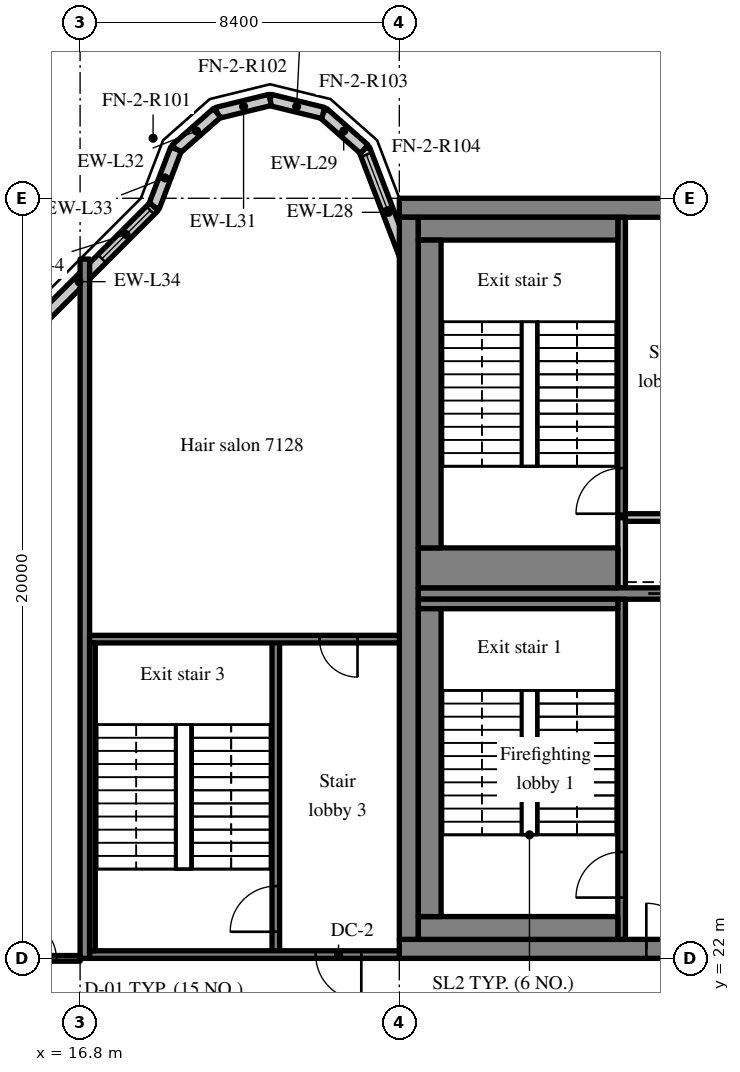
"""IFC4 building model, lengths in metres.
Left out: names, types, materials, properties, quantities, classifications, styles, units other than length and angle.
Written with IfcOpenShell. Run it as: python <this file> out.ifc"""

import sys

from ifc_helpers import new_model, si_unit, direction, frame, frame_2d, origin, place, context, subcontext, project, spatial, rectangle, extrude, source, transform, mapped, element, fill, save


model = new_model("IFC4")
c1 = context("Model", 3, precision=1e-05, world=origin(), true_north=direction((0.0, 1.0)))
c2 = subcontext(c1, "Body", "Model", "MODEL_VIEW")
j1 = project(units=[si_unit("LENGTHUNIT", "METRE"), si_unit("PLANEANGLEUNIT", "RADIAN")], contexts=[c1])
p1 = place(None, origin())
s1 = spatial("IfcSite", under=j1, at=p1, CompositionType="ELEMENT")
p2 = place(p1, origin())
s2 = spatial("IfcBuilding", under=s1, at=p2, CompositionType="ELEMENT")
p3 = place(p2, frame((0.0, 0.0, 297.7)))
s3 = spatial("IfcBuildingStorey", under=s2, at=p3, CompositionType="ELEMENT", Elevation=297.7)
m1 = source(origin(), c2, "Body", "SweptSolid", [
    extrude(rectangle(XDim=50.4, YDim=0.5, at=frame_2d((25.2, 0.0))), origin(), (0.0, 0.0, 1.0), 3.72),
])
p4 = place(p3, frame((25.2, 22.25, 0.0), z_axis=(0.0, 0.0, 1.0), x_axis=(1.0, 0.0, 0.0)))
e1 = element("IfcWall", 1, at=p4, inside=s3, PredefinedType="SHEAR", context=c2, shape_type="MappedRepresentation", body=[
    mapped(m1, transform((0.0, 0.0, 0.0), scale=1.0)),
])
m2 = source(origin(), c2, "Body", "SweptSolid", [
    extrude(rectangle(XDim=1.8, YDim=2.1, at=frame_2d((0.9, 1.05))), frame((0.0, 0.26, 0.0), z_axis=(0.0, -1.0, 0.0), x_axis=(1.0, 0.0, 0.0)), (0.0, 0.0, 1.0), 0.52),
])
p5 = place(p4, frame((15.9, 0.0, 0.0)))
e2 = element("IfcOpeningElement", 2, at=p5, cuts=e1, PredefinedType="OPENING", context=c2, shape_type="MappedRepresentation", body=[
    mapped(m2, transform((0.0, 0.0, 0.0), scale=1.0)),
])
m3 = source(origin(), c2, "Body", "SweptSolid", [
    extrude(rectangle(XDim=0.9, YDim=2.1, at=frame_2d((0.45, 1.05))), frame((0.0, 0.26, 0.0), z_axis=(0.0, -1.0, 0.0), x_axis=(1.0, 0.0, 0.0)), (0.0, 0.0, 1.0), 0.52),
])
p6 = place(p4, frame((9.675, 0.0, 0.0)))
e3 = element("IfcOpeningElement", 3, at=p6, cuts=e1, PredefinedType="OPENING", context=c2, shape_type="MappedRepresentation", body=[
    mapped(m3, transform((0.0, 0.0, 0.0), scale=1.0)),
])
p7 = place(p4, frame((21.525, 0.0, 0.0)))
e4 = element("IfcOpeningElement", 4, at=p7, cuts=e1, PredefinedType="OPENING", context=c2, shape_type="MappedRepresentation", body=[
    mapped(m3, transform((0.0, 0.0, 0.0), scale=1.0)),
])
p8 = place(p4, frame((32.7, 0.0, 0.0)))
e5 = element("IfcOpeningElement", 5, at=p8, cuts=e1, PredefinedType="OPENING", context=c2, shape_type="MappedRepresentation", body=[
    mapped(m2, transform((0.0, 0.0, 0.0), scale=1.0)),
])
m4 = source(origin(), c2, "Body", "SweptSolid", [
    extrude(rectangle(XDim=1.2, YDim=2.1, at=frame_2d((0.6, 1.05))), frame((0.0, 0.26, 0.0), z_axis=(0.0, -1.0, 0.0), x_axis=(1.0, 0.0, 0.0)), (0.0, 0.0, 1.0), 0.52),
])
p9 = place(p4, frame((6.5, 0.0, 0.0)))
e6 = element("IfcOpeningElement", 6, at=p9, cuts=e1, PredefinedType="OPENING", context=c2, shape_type="MappedRepresentation", body=[
    mapped(m4, transform((0.0, 0.0, 0.0), scale=1.0)),
])
p10 = place(p4, frame((47.975, 0.0, 0.0)))
e7 = element("IfcOpeningElement", 7, at=p10, cuts=e1, PredefinedType="OPENING", context=c2, shape_type="MappedRepresentation", body=[
    mapped(m4, transform((0.0, 0.0, 0.0), scale=1.0)),
])
p11 = place(p3, frame((25.2, 41.75, 0.0), z_axis=(0.0, 0.0, 1.0), x_axis=(1.0, 0.0, 0.0)))
e8 = element("IfcWall", 8, at=p11, inside=s3, PredefinedType="SHEAR", context=c2, shape_type="MappedRepresentation", body=[
    mapped(m1, transform((0.0, 0.0, 0.0), scale=1.0)),
])
m5 = source(origin(), c2, "Body", "SweptSolid", [
    extrude(rectangle(XDim=19.0, YDim=0.5, at=frame_2d((9.5, 0.0))), origin(), (0.0, 0.0, 1.0), 3.72),
])
p12 = place(p3, frame((25.45, 22.5, 0.0), z_axis=(0.0, 0.0, 1.0), x_axis=(0.0, 1.0, 0.0)))
e9 = element("IfcWall", 9, at=p12, inside=s3, PredefinedType="SHEAR", context=c2, shape_type="MappedRepresentation", body=[
    mapped(m5, transform((0.0, 0.0, 0.0), scale=1.0)),
])
m6 = source(origin(), c2, "Body", "SweptSolid", [
    extrude(rectangle(XDim=7.75, YDim=0.3, at=frame_2d((3.875, 0.0))), origin(), (0.0, 0.0, 1.0), 3.72),
])
p13 = place(p3, frame((25.7, 31.6, 0.0), z_axis=(0.0, 0.0, 1.0), x_axis=(1.0, 0.0, 0.0)))
e10 = element("IfcWall", 10, at=p13, inside=s3, PredefinedType="SHEAR", context=c2, shape_type="MappedRepresentation", body=[
    mapped(m6, transform((0.0, 0.0, 0.0), scale=1.0)),
])
m7 = source(origin(), c2, "Body", "SweptSolid", [
    extrude(rectangle(XDim=1.1, YDim=2.1, at=frame_2d((0.55, 1.05))), frame((0.0, 0.16, 0.0), z_axis=(0.0, -1.0, 0.0), x_axis=(1.0, 0.0, 0.0)), (0.0, 0.0, 1.0), 0.32),
])
p14 = place(p13, frame((6.05, 0.0, 0.0)))
e11 = element("IfcOpeningElement", 11, at=p14, cuts=e10, PredefinedType="OPENING", context=c2, shape_type="MappedRepresentation", body=[
    mapped(m7, transform((0.0, 0.0, 0.0), scale=1.0)),
])
m8 = source(origin(), c2, "Body", "SweptSolid", [
    extrude(rectangle(XDim=18.4, YDim=0.25, at=frame_2d((9.2, 0.0))), origin(), (0.0, 0.0, 1.0), 3.72),
])
p15 = place(p3, frame((16.925, 22.0, 0.0), z_axis=(0.0, 0.0, 1.0), x_axis=(0.0, 1.0, 0.0)))
e12 = element("IfcWall", 12, at=p15, inside=s3, PredefinedType="SHEAR", context=c2, shape_type="MappedRepresentation", body=[
    mapped(m8, transform((0.0, 0.0, 0.0), scale=1.0)),
])
m9 = source(origin(), c2, "Body", "SweptSolid", [
    extrude(rectangle(XDim=3.559, YDim=0.3, at=frame_2d((1.78, 0.0))), origin(), (0.0, 0.0, 1.0), 3.72),
])
p16 = place(p3, frame((25.55, 39.969, 0.0), z_axis=(0.0, 0.0, 1.0), x_axis=(-0.35779745313, 0.933799219604, 0.0)))
e13 = element("IfcWall", 13, at=p16, inside=s3, PredefinedType="SOLIDWALL", context=c2, shape_type="MappedRepresentation", body=[
    mapped(m9, transform((0.0, 0.0, 0.0), scale=1.0)),
])
m10 = source(origin(), c2, "Body", "SweptSolid", [
    extrude(rectangle(XDim=1.5, YDim=2.0, at=frame_2d((0.75, 1.0))), frame((0.0, 0.16, 0.0), z_axis=(0.0, -1.0, 0.0), x_axis=(1.0, 0.0, 0.0)), (0.0, 0.0, 1.0), 0.32),
])
p17 = place(p16, frame((1.903, 0.0, 0.9)))
e14 = element("IfcOpeningElement", 14, at=p17, cuts=e13, PredefinedType="OPENING", context=c2, shape_type="MappedRepresentation", body=[
    mapped(m10, transform((0.0, 0.0, 0.0), scale=1.0)),
])
m11 = source(origin(), c2, "Body", "SweptSolid", [
    extrude(rectangle(XDim=1.44, YDim=0.3, at=frame_2d((0.72, 0.0))), origin(), (0.0, 0.0, 1.0), 3.72),
])
p18 = place(p3, frame((24.277, 43.292, 0.0), z_axis=(0.0, 0.0, 1.0), x_axis=(-0.749649827867, 0.661834673902, 0.0)))
e15 = element("IfcWall", 15, at=p18, inside=s3, PredefinedType="SOLIDWALL", context=c2, shape_type="MappedRepresentation", body=[
    mapped(m11, transform((0.0, 0.0, 0.0), scale=1.0)),
])
m12 = source(origin(), c2, "Body", "SweptSolid", [
    extrude(rectangle(XDim=1.438, YDim=0.3, at=frame_2d((0.719, 0.0))), origin(), (0.0, 0.0, 1.0), 3.72),
])
p19 = place(p3, frame((23.197, 44.245, 0.0), z_axis=(0.0, 0.0, 1.0), x_axis=(-0.971152283879, 0.238460146601, 0.0)))
e16 = element("IfcWall", 16, at=p19, inside=s3, PredefinedType="SOLIDWALL", context=c2, shape_type="MappedRepresentation", body=[
    mapped(m12, transform((0.0, 0.0, 0.0), scale=1.0)),
])
m13 = source(origin(), c2, "Body", "SweptSolid", [
    extrude(rectangle(XDim=1.439, YDim=0.3, at=frame_2d((0.719, 0.0))), origin(), (0.0, 0.0, 1.0), 3.72),
])
p20 = place(p3, frame((21.8, 44.588, 0.0), z_axis=(0.0, 0.0, 1.0), x_axis=(-0.971161932466, -0.238420848351, 0.0)))
e17 = element("IfcWall", 17, at=p20, inside=s3, PredefinedType="SOLIDWALL", context=c2, shape_type="MappedRepresentation", body=[
    mapped(m13, transform((0.0, 0.0, 0.0), scale=1.0)),
])
m14 = source(origin(), c2, "Body", "SweptSolid", [
    extrude(rectangle(XDim=1.44, YDim=0.3, at=frame_2d((0.72, 0.0))), origin(), (0.0, 0.0, 1.0), 3.72),
])
p21 = place(p3, frame((20.403, 44.245, 0.0), z_axis=(0.0, 0.0, 1.0), x_axis=(-0.74957555648, -0.661918790432, 0.0)))
e18 = element("IfcWall", 18, at=p21, inside=s3, PredefinedType="SOLIDWALL", context=c2, shape_type="MappedRepresentation", body=[
    mapped(m14, transform((0.0, 0.0, 0.0), scale=1.0)),
])
m15 = source(origin(), c2, "Body", "SweptSolid", [
    extrude(rectangle(XDim=1.622, YDim=0.3, at=frame_2d((0.811, 0.0))), origin(), (0.0, 0.0, 1.0), 3.72),
])
p22 = place(p3, frame((19.323, 43.292, 0.0), z_axis=(0.0, 0.0, 1.0), x_axis=(-0.357778527068, -0.933806471154, 0.0)))
e19 = element("IfcWall", 19, at=p22, inside=s3, PredefinedType="SOLIDWALL", context=c2, shape_type="MappedRepresentation", body=[
    mapped(m15, transform((0.0, 0.0, 0.0), scale=1.0)),
])
m16 = source(origin(), c2, "Body", "SweptSolid", [
    extrude(rectangle(XDim=5.576, YDim=0.3, at=frame_2d((2.788, 0.0))), origin(), (0.0, 0.0, 1.0), 3.72),
])
p23 = place(p3, frame((18.743, 41.777, 0.0), z_axis=(0.0, 0.0, 1.0), x_axis=(-0.707106781187, -0.707106781187, 0.0)))
e20 = element("IfcWall", 20, at=p23, inside=s3, PredefinedType="SOLIDWALL", context=c2, shape_type="MappedRepresentation", body=[
    mapped(m16, transform((0.0, 0.0, 0.0), scale=1.0)),
])
m17 = source(origin(), c2, "Body", "SweptSolid", [
    extrude(rectangle(XDim=1.8, YDim=1.5, at=frame_2d((0.9, 0.75))), frame((0.0, 0.16, 0.0), z_axis=(0.0, -1.0, 0.0), x_axis=(1.0, 0.0, 0.0)), (0.0, 0.0, 1.0), 0.32),
])
p24 = place(p23, frame((0.135, 0.0, 0.9)))
e21 = element("IfcOpeningElement", 21, at=p24, cuts=e20, PredefinedType="OPENING", context=c2, shape_type="MappedRepresentation", body=[
    mapped(m17, transform((0.0, 0.0, 0.0), scale=1.0)),
])
m18 = source(origin(), c2, "Body", "SweptSolid", [
    extrude(rectangle(XDim=8.95, YDim=0.2, at=frame_2d((4.475, 0.0))), origin(), (0.0, 0.0, 1.0), 3.72),
])
p25 = place(p3, frame((31.05, 22.5, 0.0), z_axis=(0.0, 0.0, 1.0), x_axis=(0.0, 1.0, 0.0)))
e22 = element("IfcWall", 22, at=p25, inside=s3, PredefinedType="SOLIDWALL", context=c2, shape_type="MappedRepresentation", body=[
    mapped(m18, transform((0.0, 0.0, 0.0), scale=1.0)),
])
m19 = source(origin(), c2, "Body", "SweptSolid", [
    extrude(rectangle(XDim=1.2, YDim=2.1, at=frame_2d((0.6, 1.05))), frame((0.0, 0.11, 0.0), z_axis=(0.0, -1.0, 0.0), x_axis=(1.0, 0.0, 0.0)), (0.0, 0.0, 1.0), 0.22),
])
p26 = place(p25, frame((1.1, 0.0, 0.0)))
e23 = element("IfcOpeningElement", 23, at=p26, cuts=e22, PredefinedType="OPENING", context=c2, shape_type="MappedRepresentation", body=[
    mapped(m19, transform((0.0, 0.0, 0.0), scale=1.0)),
])
m20 = source(origin(), c2, "Body", "SweptSolid", [
    extrude(rectangle(XDim=1.85, YDim=0.2, at=frame_2d((0.925, 0.0))), origin(), (0.0, 0.0, 1.0), 3.72),
])
p27 = place(p3, frame((31.05, 31.75, 0.0), z_axis=(0.0, 0.0, 1.0), x_axis=(0.0, 1.0, 0.0)))
e24 = element("IfcWall", 24, at=p27, inside=s3, PredefinedType="SOLIDWALL", context=c2, shape_type="MappedRepresentation", body=[
    mapped(m20, transform((0.0, 0.0, 0.0), scale=1.0)),
])
m21 = source(origin(), c2, "Body", "SweptSolid", [
    extrude(rectangle(XDim=2.3, YDim=0.2, at=frame_2d((1.15, 0.0))), origin(), (0.0, 0.0, 1.0), 3.72),
])
p28 = place(p3, frame((31.15, 33.6, 0.0), z_axis=(0.0, 0.0, 1.0), x_axis=(1.0, 0.0, 0.0)))
e25 = element("IfcWall", 25, at=p28, inside=s3, PredefinedType="SOLIDWALL", context=c2, shape_type="MappedRepresentation", body=[
    mapped(m21, transform((0.0, 0.0, 0.0), scale=1.0)),
])
m22 = source(origin(), c2, "Body", "SweptSolid", [
    extrude(rectangle(XDim=7.9, YDim=0.2, at=frame_2d((3.95, 0.0))), origin(), (0.0, 0.0, 1.0), 3.72),
])
p29 = place(p3, frame((31.05, 33.6, 0.0), z_axis=(0.0, 0.0, 1.0), x_axis=(0.0, 1.0, 0.0)))
e26 = element("IfcWall", 26, at=p29, inside=s3, PredefinedType="SOLIDWALL", context=c2, shape_type="MappedRepresentation", body=[
    mapped(m22, transform((0.0, 0.0, 0.0), scale=1.0)),
])
p30 = place(p29, frame((0.1, 0.0, 0.0)))
e27 = element("IfcOpeningElement", 27, at=p30, cuts=e26, PredefinedType="OPENING", context=c2, shape_type="MappedRepresentation", body=[
    mapped(m19, transform((0.0, 0.0, 0.0), scale=1.0)),
])
m23 = source(origin(), c2, "Body", "SweptSolid", [
    extrude(rectangle(XDim=8.3, YDim=0.2, at=frame_2d((4.15, 0.0))), origin(), (0.0, 0.0, 1.0), 3.72),
])
p31 = place(p3, frame((21.95, 22.1, 0.0), z_axis=(0.0, 0.0, 1.0), x_axis=(0.0, 1.0, 0.0)))
e28 = element("IfcWall", 28, at=p31, inside=s3, PredefinedType="SOLIDWALL", context=c2, shape_type="MappedRepresentation", body=[
    mapped(m23, transform((0.0, 0.0, 0.0), scale=1.0)),
])
p32 = place(p31, frame((0.6, 0.0, 0.0)))
e29 = element("IfcOpeningElement", 29, at=p32, cuts=e28, PredefinedType="OPENING", context=c2, shape_type="MappedRepresentation", body=[
    mapped(m19, transform((0.0, 0.0, 0.0), scale=1.0)),
])
m24 = source(origin(), c2, "Body", "SweptSolid", [
    extrude(rectangle(XDim=8.15, YDim=0.2, at=frame_2d((4.075, 0.0))), origin(), (0.0, 0.0, 1.0), 3.72),
])
p33 = place(p3, frame((17.05, 22.1, 0.0), z_axis=(0.0, 0.0, 1.0), x_axis=(1.0, 0.0, 0.0)))
e30 = element("IfcWall", 30, at=p33, inside=s3, PredefinedType="SOLIDWALL", context=c2, shape_type="MappedRepresentation", body=[
    mapped(m24, transform((0.0, 0.0, 0.0), scale=1.0)),
])
p34 = place(p33, frame((5.95, 0.0, 0.0)))
e31 = element("IfcOpeningElement", 31, at=p34, cuts=e30, PredefinedType="OPENING", context=c2, shape_type="MappedRepresentation", body=[
    mapped(m19, transform((0.0, 0.0, 0.0), scale=1.0)),
])
p35 = place(p3, frame((17.05, 30.4, 0.0), z_axis=(0.0, 0.0, 1.0), x_axis=(1.0, 0.0, 0.0)))
e32 = element("IfcWall", 32, at=p35, inside=s3, PredefinedType="SOLIDWALL", context=c2, shape_type="MappedRepresentation", body=[
    mapped(m24, transform((0.0, 0.0, 0.0), scale=1.0)),
])
m25 = source(origin(), c2, "Body", "SweptSolid", [
    extrude(rectangle(XDim=1.0, YDim=2.1, at=frame_2d((0.5, 1.05))), frame((0.0, 0.11, 0.0), z_axis=(0.0, -1.0, 0.0), x_axis=(1.0, 0.0, 0.0)), (0.0, 0.0, 1.0), 0.22),
])
p36 = place(p35, frame((6.05, 0.0, 0.0)))
e33 = element("IfcOpeningElement", 33, at=p36, cuts=e32, PredefinedType="OPENING", context=c2, shape_type="MappedRepresentation", body=[
    mapped(m25, transform((0.0, 0.0, 0.0), scale=1.0)),
])
m26 = source(origin(), c2, "Body", "SweptSolid", [
    extrude(rectangle(XDim=5.25, YDim=0.6, at=frame_2d((2.625, 0.0))), origin(), (0.0, 0.0, 1.0), 3.72),
])
p37 = place(p3, frame((25.7, 22.8, 0.0), z_axis=(0.0, 0.0, 1.0), x_axis=(1.0, 0.0, 0.0)))
e34 = element("IfcWall", 34, at=p37, inside=s3, PredefinedType="SOLIDWALL", context=c2, shape_type="MappedRepresentation", body=[
    mapped(m26, transform((0.0, 0.0, 0.0), scale=1.0)),
])
m27 = source(origin(), c2, "Body", "SweptSolid", [
    extrude(rectangle(XDim=5.25, YDim=0.25, at=frame_2d((2.625, 0.0))), origin(), (0.0, 0.0, 1.0), 3.72),
])
p38 = place(p3, frame((25.7, 31.325, 0.0), z_axis=(0.0, 0.0, 1.0), x_axis=(1.0, 0.0, 0.0)))
e35 = element("IfcWall", 35, at=p38, inside=s3, PredefinedType="SOLIDWALL", context=c2, shape_type="MappedRepresentation", body=[
    mapped(m27, transform((0.0, 0.0, 0.0), scale=1.0)),
])
m28 = source(origin(), c2, "Body", "SweptSolid", [
    extrude(rectangle(XDim=8.1, YDim=0.6, at=frame_2d((4.05, 0.0))), origin(), (0.0, 0.0, 1.0), 3.72),
])
p39 = place(p3, frame((26.0, 23.1, 0.0), z_axis=(0.0, 0.0, 1.0), x_axis=(0.0, 1.0, 0.0)))
e36 = element("IfcWall", 36, at=p39, inside=s3, PredefinedType="SOLIDWALL", context=c2, shape_type="MappedRepresentation", body=[
    mapped(m28, transform((0.0, 0.0, 0.0), scale=1.0)),
])
m29 = source(origin(), c2, "Body", "SweptSolid", [
    extrude(rectangle(XDim=8.1, YDim=0.15, at=frame_2d((4.05, 0.0))), origin(), (0.0, 0.0, 1.0), 3.72),
])
p40 = place(p3, frame((17.125, 22.2, 0.0), z_axis=(0.0, 0.0, 1.0), x_axis=(0.0, 1.0, 0.0)))
e37 = element("IfcWall", 37, at=p40, inside=s3, PredefinedType="SOLIDWALL", context=c2, shape_type="MappedRepresentation", body=[
    mapped(m29, transform((0.0, 0.0, 0.0), scale=1.0)),
])
p41 = place(p3, frame((25.7, 41.2, 0.0), z_axis=(0.0, 0.0, 1.0), x_axis=(1.0, 0.0, 0.0)))
e38 = element("IfcWall", 38, at=p41, inside=s3, PredefinedType="SOLIDWALL", context=c2, shape_type="MappedRepresentation", body=[
    mapped(m26, transform((0.0, 0.0, 0.0), scale=1.0)),
])
m30 = source(origin(), c2, "Body", "SweptSolid", [
    extrude(rectangle(XDim=5.25, YDim=1.05, at=frame_2d((2.625, 0.0))), origin(), (0.0, 0.0, 1.0), 3.72),
])
p42 = place(p3, frame((25.7, 32.275, 0.0), z_axis=(0.0, 0.0, 1.0), x_axis=(1.0, 0.0, 0.0)))
e39 = element("IfcWall", 39, at=p42, inside=s3, PredefinedType="SOLIDWALL", context=c2, shape_type="MappedRepresentation", body=[
    mapped(m30, transform((0.0, 0.0, 0.0), scale=1.0)),
])
p43 = place(p3, frame((26.0, 32.8, 0.0), z_axis=(0.0, 0.0, 1.0), x_axis=(0.0, 1.0, 0.0)))
e40 = element("IfcWall", 40, at=p43, inside=s3, PredefinedType="SOLIDWALL", context=c2, shape_type="MappedRepresentation", body=[
    mapped(m28, transform((0.0, 0.0, 0.0), scale=1.0)),
])
m31 = source(origin(), c2, "Body", "SweptSolid", [
    extrude(rectangle(XDim=1.9, YDim=0.15, at=frame_2d((0.95, 0.0))), origin(), (0.0, 0.0, 1.0), 3.02),
])
p44 = place(p3, frame((14.9, 22.0, 0.0), z_axis=(0.0, 0.0, 1.0), x_axis=(1.0, 0.0, 0.0)))
e41 = element("IfcWall", 41, at=p44, inside=s3, PredefinedType="PARTITIONING", context=c2, shape_type="MappedRepresentation", body=[
    mapped(m31, transform((0.0, 0.0, 0.0), scale=1.0)),
])
m32 = source(origin(), c2, "Body", "SweptSolid", [
    extrude(rectangle(XDim=1.0, YDim=2.1, at=frame_2d((0.5, 1.05))), frame((0.0, 0.085, 0.0), z_axis=(0.0, -1.0, 0.0), x_axis=(1.0, 0.0, 0.0)), (0.0, 0.0, 1.0), 0.17),
])
p45 = place(p44, frame((0.275, 0.0, 0.0)))
e42 = element("IfcOpeningElement", 42, at=p45, cuts=e41, PredefinedType="OPENING", context=c2, shape_type="MappedRepresentation", body=[
    mapped(m32, transform((0.0, 0.0, 0.0), scale=1.0)),
])
m33 = source(origin(), c2, "Body", "SweptSolid", [
    extrude(rectangle(XDim=1.5, YDim=2.0, at=frame_2d((0.75, 1.0))), frame((0.0, 0.03, 0.0), z_axis=(0.0, -1.0, 0.0), x_axis=(1.0, 0.0, 0.0)), (0.0, 0.0, 1.0), 0.06),
])
p46 = place(p17, origin())
e43 = element("IfcWindow", 43, at=p46, inside=s3, PartitioningType="SINGLE_PANEL", PredefinedType="WINDOW", context=c2, shape_type="MappedRepresentation", body=[
    mapped(m33, transform((0.0, 0.0, 0.0), scale=1.0)),
])
fill(e14, e43)
m34 = source(origin(), c2, "Body", "SweptSolid", [
    extrude(rectangle(XDim=1.8, YDim=1.5, at=frame_2d((0.9, 0.75))), frame((0.0, 0.03, 0.0), z_axis=(0.0, -1.0, 0.0), x_axis=(1.0, 0.0, 0.0)), (0.0, 0.0, 1.0), 0.06),
])
p47 = place(p24, origin())
e44 = element("IfcWindow", 44, at=p47, inside=s3, PartitioningType="SINGLE_PANEL", PredefinedType="WINDOW", context=c2, shape_type="MappedRepresentation", body=[
    mapped(m34, transform((0.0, 0.0, 0.0), scale=1.0)),
])
fill(e21, e44)
m35 = source(origin(), c2, "Body", "SweptSolid", [
    extrude(rectangle(XDim=1.2, YDim=2.1, at=frame_2d((0.6, 1.05))), frame((0.0, 0.025, 0.0), z_axis=(0.0, -1.0, 0.0), x_axis=(1.0, 0.0, 0.0)), (0.0, 0.0, 1.0), 0.05),
])
p48 = place(p26, origin())
e45 = element("IfcDoor", 45, at=p48, inside=s3, OperationType="SINGLE_SWING_LEFT", PredefinedType="DOOR", context=c2, shape_type="MappedRepresentation", body=[
    mapped(m35, transform((0.0, 0.0, 0.0), scale=1.0)),
])
fill(e23, e45)
m36 = source(origin(), c2, "Body", "SweptSolid", [
    extrude(rectangle(XDim=1.2, YDim=2.1, at=frame_2d((0.6, 1.05))), frame((0.0, 0.175, 0.0), z_axis=(0.0, -1.0, 0.0), x_axis=(1.0, 0.0, 0.0)), (0.0, 0.0, 1.0), 0.05),
])
p49 = place(p9, origin())
e46 = element("IfcDoor", 46, at=p49, inside=s3, OperationType="SINGLE_SWING_LEFT", PredefinedType="DOOR", context=c2, shape_type="MappedRepresentation", body=[
    mapped(m36, transform((0.0, 0.0, 0.0), scale=1.0)),
])
fill(e6, e46)
m37 = source(origin(), c2, "Body", "SweptSolid", [
    extrude(rectangle(XDim=1.1, YDim=2.1, at=frame_2d((0.55, 1.05))), frame((0.0, 0.025, 0.0), z_axis=(0.0, -1.0, 0.0), x_axis=(1.0, 0.0, 0.0)), (0.0, 0.0, 1.0), 0.05),
])
p50 = place(p14, origin())
e47 = element("IfcDoor", 47, at=p50, inside=s3, OperationType="SLIDING_TO_LEFT", PredefinedType="DOOR", context=c2, shape_type="MappedRepresentation", body=[
    mapped(m37, transform((0.0, 0.0, 0.0), scale=1.0)),
])
fill(e11, e47)
p51 = place(p30, origin())
e48 = element("IfcDoor", 48, at=p51, inside=s3, OperationType="SINGLE_SWING_LEFT", PredefinedType="DOOR", context=c2, shape_type="MappedRepresentation", body=[
    mapped(m35, transform((0.0, 0.0, 0.0), scale=1.0)),
])
fill(e27, e48)
p52 = place(p32, origin())
e49 = element("IfcDoor", 49, at=p52, inside=s3, OperationType="SINGLE_SWING_LEFT", PredefinedType="DOOR", context=c2, shape_type="MappedRepresentation", body=[
    mapped(m35, transform((0.0, 0.0, 0.0), scale=1.0)),
])
fill(e29, e49)
p53 = place(p34, origin())
e50 = element("IfcDoor", 50, at=p53, inside=s3, OperationType="SINGLE_SWING_RIGHT", PredefinedType="DOOR", context=c2, shape_type="MappedRepresentation", body=[
    mapped(m35, transform((0.0, 0.0, 0.0), scale=1.0)),
])
fill(e31, e50)
m38 = source(origin(), c2, "Body", "SweptSolid", [
    extrude(rectangle(XDim=1.0, YDim=2.1, at=frame_2d((0.5, 1.05))), frame((0.0, 0.025, 0.0), z_axis=(0.0, -1.0, 0.0), x_axis=(1.0, 0.0, 0.0)), (0.0, 0.0, 1.0), 0.05),
])
p54 = place(p36, origin())
e51 = element("IfcDoor", 51, at=p54, inside=s3, OperationType="SINGLE_SWING_RIGHT", PredefinedType="DOOR", context=c2, shape_type="MappedRepresentation", body=[
    mapped(m38, transform((0.0, 0.0, 0.0), scale=1.0)),
])
fill(e33, e51)
p55 = place(p45, origin())
e52 = element("IfcDoor", 52, at=p55, inside=s3, OperationType="SINGLE_SWING_LEFT", PredefinedType="DOOR", context=c2, shape_type="MappedRepresentation", body=[
    mapped(m38, transform((0.0, 0.0, 0.0), scale=1.0)),
])
fill(e42, e52)
save(model, sys.argv[1])
